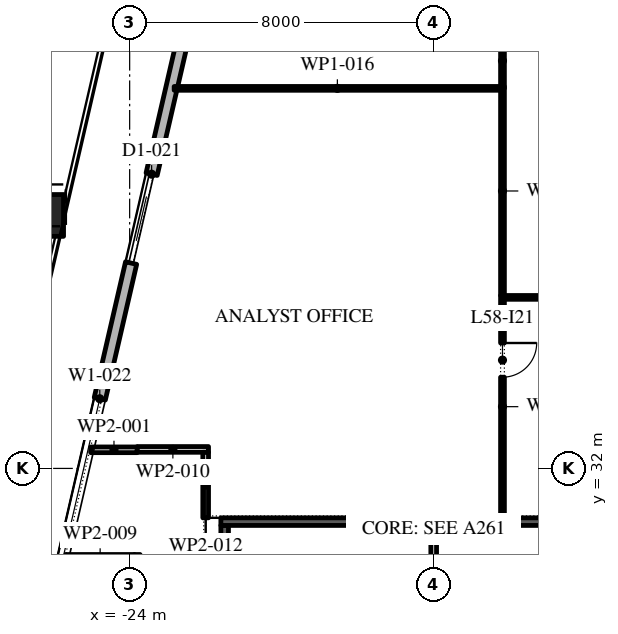
"""IFC4 building model, lengths in metres.
Left out: names, types, materials, properties, quantities, classifications, styles, units other than length and angle.
Written with IfcOpenShell. Run it as: python <this file> out.ifc"""

import sys

from ifc_helpers import new_model, si_unit, direction, frame, frame_2d, origin, origin_2d, place, context, subcontext, project, spatial, rectangle, extrude, element, fill, save


model = new_model("IFC4")
c1 = context("Model", 3, precision=1e-05, world=origin(), true_north=direction((0.0, 1.0)))
c2 = subcontext(c1, "Body", "Model", "MODEL_VIEW")
j1 = project(units=[si_unit("LENGTHUNIT", "METRE"), si_unit("PLANEANGLEUNIT", "RADIAN")], contexts=[c1])
p1 = place(None, origin())
s1 = spatial("IfcSite", under=j1, at=p1, CompositionType="ELEMENT")
p2 = place(p1, origin())
s2 = spatial("IfcBuilding", under=s1, at=p2, CompositionType="ELEMENT")
p3 = place(p2, frame((0.0, 0.0, 268.2)))
s3 = spatial("IfcBuildingStorey", under=s2, at=p3, CompositionType="ELEMENT", Elevation=268.2)
p4 = place(p3, frame((-26.29, 38.656, 0.0), z_axis=(0.014559841898, 0.063111984005, 0.997900239743), x_axis=(-0.97440628778, 0.224794097641, 0.0)))
e1 = element("IfcColumn", 1, at=p4, inside=s3, PredefinedType="COLUMN", context=c2, shape_type="SweptSolid", body=[
    extrude(rectangle(XDim=1.1, YDim=1.1, at=origin_2d()), origin(), (0.0, 0.0, 1.0), 4.209),
])
p5 = place(p3, frame((29.616, 40.758, 0.0), z_axis=(0.0, 0.0, 1.0), x_axis=(-0.974370532314, 0.224949029246, 0.0)))
e2 = element("IfcWall", 2, at=p5, inside=s3, PredefinedType="STANDARD", context=c2, shape_type="SweptSolid", body=[
    extrude(rectangle(XDim=48.0, YDim=0.3, at=frame_2d((24.0, 0.0))), origin(), (0.0, 0.0, 1.0), 4.0),
])
p6 = place(p5, frame((1.625, 0.0, 0.45)))
e3 = element("IfcOpeningElement", 3, at=p6, cuts=e2, PredefinedType="OPENING", context=c2, shape_type="SweptSolid", body=[
    extrude(rectangle(XDim=4.5, YDim=2.575, at=frame_2d((2.25, 1.288))), frame((0.0, 0.16, 0.0), z_axis=(0.0, -1.0, 0.0), x_axis=(1.0, 0.0, 0.0)), (0.0, 0.0, 1.0), 0.32),
])
p7 = place(p5, frame((10.575, 0.0, 0.0)))
e4 = element("IfcOpeningElement", 4, at=p7, cuts=e2, PredefinedType="OPENING", context=c2, shape_type="SweptSolid", body=[
    extrude(rectangle(XDim=2.4, YDim=3.5, at=frame_2d((1.2, 1.75))), frame((0.0, 0.16, 0.0), z_axis=(0.0, -1.0, 0.0), x_axis=(1.0, 0.0, 0.0)), (0.0, 0.0, 1.0), 0.32),
])
p8 = place(p5, frame((17.575, 0.0, 0.45)))
e5 = element("IfcOpeningElement", 5, at=p8, cuts=e2, PredefinedType="OPENING", context=c2, shape_type="SweptSolid", body=[
    extrude(rectangle(XDim=4.5, YDim=2.45, at=frame_2d((2.25, 1.225))), frame((0.0, 0.16, 0.0), z_axis=(0.0, -1.0, 0.0), x_axis=(1.0, 0.0, 0.0)), (0.0, 0.0, 1.0), 0.32),
])
p9 = place(p5, frame((25.625, 0.0, 0.45)))
e6 = element("IfcOpeningElement", 6, at=p9, cuts=e2, PredefinedType="OPENING", context=c2, shape_type="SweptSolid", body=[
    extrude(rectangle(XDim=4.5, YDim=2.45, at=frame_2d((2.25, 1.225))), frame((0.0, 0.16, 0.0), z_axis=(0.0, -1.0, 0.0), x_axis=(1.0, 0.0, 0.0)), (0.0, 0.0, 1.0), 0.32),
])
p10 = place(p5, frame((33.675, 0.0, 0.45)))
e7 = element("IfcOpeningElement", 7, at=p10, cuts=e2, PredefinedType="OPENING", context=c2, shape_type="SweptSolid", body=[
    extrude(rectangle(XDim=4.5, YDim=2.45, at=frame_2d((2.25, 1.225))), frame((0.0, 0.16, 0.0), z_axis=(0.0, -1.0, 0.0), x_axis=(1.0, 0.0, 0.0)), (0.0, 0.0, 1.0), 0.32),
])
p11 = place(p5, frame((42.175, 0.0, 0.0)))
e8 = element("IfcOpeningElement", 8, at=p11, cuts=e2, PredefinedType="OPENING", context=c2, shape_type="SweptSolid", body=[
    extrude(rectangle(XDim=2.4, YDim=3.5, at=frame_2d((1.2, 1.75))), frame((0.0, 0.16, 0.0), z_axis=(0.0, -1.0, 0.0), x_axis=(1.0, 0.0, 0.0)), (0.0, 0.0, 1.0), 0.32),
])
p12 = place(p3, frame((-21.359, 48.678, 0.0), z_axis=(0.0, 0.0, 1.0), x_axis=(-0.224949198343, -0.974370493275, 0.0)))
e9 = element("IfcWall", 9, at=p12, inside=s3, PredefinedType="STANDARD", context=c2, shape_type="SweptSolid", body=[
    extrude(rectangle(XDim=49.5, YDim=0.3, at=frame_2d((24.75, 0.0))), origin(), (0.0, 0.0, 1.0), 4.0),
])
p13 = place(p12, frame((1.157, 0.0, 0.45)))
e10 = element("IfcOpeningElement", 10, at=p13, cuts=e9, PredefinedType="OPENING", context=c2, shape_type="SweptSolid", body=[
    extrude(rectangle(XDim=4.5, YDim=3.05, at=frame_2d((2.25, 1.525))), frame((0.0, 0.16, 0.0), z_axis=(0.0, -1.0, 0.0), x_axis=(1.0, 0.0, 0.0)), (0.0, 0.0, 1.0), 0.32),
])
p14 = place(p12, frame((9.171, 0.0, 0.0)))
e11 = element("IfcOpeningElement", 11, at=p14, cuts=e9, PredefinedType="OPENING", context=c2, shape_type="SweptSolid", body=[
    extrude(rectangle(XDim=2.4, YDim=3.5, at=frame_2d((1.2, 1.75))), frame((0.0, 0.16, 0.0), z_axis=(0.0, -1.0, 0.0), x_axis=(1.0, 0.0, 0.0)), (0.0, 0.0, 1.0), 0.32),
])
p15 = place(p12, frame((15.236, 0.0, 0.45)))
e12 = element("IfcOpeningElement", 12, at=p15, cuts=e9, PredefinedType="OPENING", context=c2, shape_type="SweptSolid", body=[
    extrude(rectangle(XDim=4.5, YDim=3.05, at=frame_2d((2.25, 1.525))), frame((0.0, 0.16, 0.0), z_axis=(0.0, -1.0, 0.0), x_axis=(1.0, 0.0, 0.0)), (0.0, 0.0, 1.0), 0.32),
])
p16 = place(p12, frame((22.35, 0.0, 0.45)))
e13 = element("IfcOpeningElement", 13, at=p16, cuts=e9, PredefinedType="OPENING", context=c2, shape_type="SweptSolid", body=[
    extrude(rectangle(XDim=4.5, YDim=3.05, at=frame_2d((2.25, 1.525))), frame((0.0, 0.16, 0.0), z_axis=(0.0, -1.0, 0.0), x_axis=(1.0, 0.0, 0.0)), (0.0, 0.0, 1.0), 0.32),
])
p17 = place(p12, frame((29.464, 0.0, 0.45)))
e14 = element("IfcOpeningElement", 14, at=p17, cuts=e9, PredefinedType="OPENING", context=c2, shape_type="SweptSolid", body=[
    extrude(rectangle(XDim=4.5, YDim=3.05, at=frame_2d((2.25, 1.525))), frame((0.0, 0.16, 0.0), z_axis=(0.0, -1.0, 0.0), x_axis=(1.0, 0.0, 0.0)), (0.0, 0.0, 1.0), 0.32),
])
p18 = place(p12, frame((37.628, 0.0, 0.0)))
e15 = element("IfcOpeningElement", 15, at=p18, cuts=e9, PredefinedType="OPENING", context=c2, shape_type="SweptSolid", body=[
    extrude(rectangle(XDim=2.4, YDim=3.325, at=frame_2d((1.2, 1.663))), frame((0.0, 0.16, 0.0), z_axis=(0.0, -1.0, 0.0), x_axis=(1.0, 0.0, 0.0)), (0.0, 0.0, 1.0), 0.32),
])
p19 = place(p12, frame((43.693, 0.0, 0.45)))
e16 = element("IfcOpeningElement", 16, at=p19, cuts=e9, PredefinedType="OPENING", context=c2, shape_type="SweptSolid", body=[
    extrude(rectangle(XDim=4.5, YDim=2.825, at=frame_2d((2.25, 1.413))), frame((0.0, 0.16, 0.0), z_axis=(0.0, -1.0, 0.0), x_axis=(1.0, 0.0, 0.0)), (0.0, 0.0, 1.0), 0.32),
])
p20 = place(p3, frame((-21.5, 25.75, 0.0), z_axis=(0.0, 0.0, 1.0), x_axis=(0.0, 1.0, 0.0)))
e17 = element("IfcWall", 17, at=p20, inside=s3, PredefinedType="SHEAR", context=c2, shape_type="SweptSolid", body=[
    extrude(rectangle(XDim=4.75, YDim=0.2, at=frame_2d((2.375, 0.0))), origin(), (0.0, 0.0, 1.0), 4.0),
])
p21 = place(p20, frame((1.925, 0.0, 0.0)))
e18 = element("IfcOpeningElement", 18, at=p21, cuts=e17, PredefinedType="OPENING", context=c2, shape_type="SweptSolid", body=[
    extrude(rectangle(XDim=0.9, YDim=2.1, at=frame_2d((0.45, 1.05))), frame((0.0, 0.11, 0.0), z_axis=(0.0, -1.0, 0.0), x_axis=(1.0, 0.0, 0.0)), (0.0, 0.0, 1.0), 0.22),
])
p22 = place(p3, frame((-21.6, 30.6, 0.0), z_axis=(0.0, 0.0, 1.0), x_axis=(1.0, 0.0, 0.0)))
e19 = element("IfcWall", 19, at=p22, inside=s3, PredefinedType="SHEAR", context=c2, shape_type="SweptSolid", body=[
    extrude(rectangle(XDim=11.2, YDim=0.2, at=frame_2d((5.6, 0.0))), origin(), (0.0, 0.0, 1.0), 4.0),
])
p23 = place(p3, frame((-16.0, 25.75, 0.0), z_axis=(0.0, 0.0, 1.0), x_axis=(0.0, 1.0, 0.0)))
e20 = element("IfcWall", 20, at=p23, inside=s3, PredefinedType="PARTITIONING", context=c2, shape_type="SweptSolid", body=[
    extrude(rectangle(XDim=4.75, YDim=0.15, at=frame_2d((2.375, 0.0))), origin(), (0.0, 0.0, 1.0), 4.0),
])
p24 = place(p3, frame((-25.025, 32.49, 0.0), z_axis=(0.0, 0.0, 1.0), x_axis=(1.0, 0.0, 0.0)))
e21 = element("IfcWall", 21, at=p24, inside=s3, PredefinedType="PARTITIONING", context=c2, shape_type="SweptSolid", body=[
    extrude(rectangle(XDim=1.225, YDim=0.15, at=frame_2d((0.612, 0.0))), origin(), (0.0, 0.0, 1.0), 4.0),
])
p25 = place(p3, frame((-23.8, 32.5, 0.0), z_axis=(0.0, 0.0, 1.0), x_axis=(1.0, 0.0, 0.0)))
e22 = element("IfcWall", 22, at=p25, inside=s3, PredefinedType="PARTITIONING", context=c2, shape_type="SweptSolid", body=[
    extrude(rectangle(XDim=1.875, YDim=0.15, at=frame_2d((0.938, 0.0))), origin(), (0.0, 0.0, 1.0), 4.0),
])
p26 = place(p3, frame((-22.0, 32.425, 0.0), z_axis=(0.0, 0.0, 1.0), x_axis=(0.0, -1.0, 0.0)))
e23 = element("IfcWall", 23, at=p26, inside=s3, PredefinedType="PARTITIONING", context=c2, shape_type="SweptSolid", body=[
    extrude(rectangle(XDim=1.725, YDim=0.15, at=frame_2d((0.863, 0.0))), origin(), (0.0, 0.0, 1.0), 4.0),
])
p27 = place(p3, frame((-14.19, 30.7, 0.0), z_axis=(0.0, 0.0, 1.0), x_axis=(0.0, 1.0, 0.0)))
e24 = element("IfcWall", 24, at=p27, inside=s3, PredefinedType="PARTITIONING", context=c2, shape_type="SweptSolid", body=[
    extrude(rectangle(XDim=5.85, YDim=0.1, at=frame_2d((2.925, 0.0))), origin(), (0.0, 0.0, 1.0), 4.0),
])
p28 = place(p27, frame((3.7, 0.0, 0.0)))
e25 = element("IfcOpeningElement", 25, at=p28, cuts=e24, PredefinedType="OPENING", context=c2, shape_type="SweptSolid", body=[
    extrude(rectangle(XDim=0.9, YDim=2.1, at=frame_2d((0.45, 1.05))), frame((0.0, 0.06, 0.0), z_axis=(0.0, -1.0, 0.0), x_axis=(1.0, 0.0, 0.0)), (0.0, 0.0, 1.0), 0.12),
])
p29 = place(p3, frame((-14.19, 36.55, 0.0), z_axis=(0.0, 0.0, 1.0), x_axis=(0.0, 1.0, 0.0)))
e26 = element("IfcWall", 26, at=p29, inside=s3, PredefinedType="PARTITIONING", context=c2, shape_type="SweptSolid", body=[
    extrude(rectangle(XDim=5.5, YDim=0.1, at=frame_2d((2.75, 0.0))), origin(), (0.0, 0.0, 1.0), 4.0),
])
p30 = place(p3, frame((-14.14, 36.5, 0.0), z_axis=(0.0, 0.0, 1.0), x_axis=(1.0, 0.0, 0.0)))
e27 = element("IfcWall", 27, at=p30, inside=s3, PredefinedType="PARTITIONING", context=c2, shape_type="SweptSolid", body=[
    extrude(rectangle(XDim=8.19, YDim=0.1, at=frame_2d((4.095, 0.0))), origin(), (0.0, 0.0, 1.0), 4.0),
])
p31 = place(p30, frame((2.79, 0.0, 0.0)))
e28 = element("IfcOpeningElement", 28, at=p31, cuts=e27, PredefinedType="OPENING", context=c2, shape_type="SweptSolid", body=[
    extrude(rectangle(XDim=0.9, YDim=2.1, at=frame_2d((0.45, 1.05))), frame((0.0, 0.06, 0.0), z_axis=(0.0, -1.0, 0.0), x_axis=(1.0, 0.0, 0.0)), (0.0, 0.0, 1.0), 0.12),
])
p32 = place(p3, frame((-14.24, 42.0, 0.0), z_axis=(0.0, 0.0, 1.0), x_axis=(-1.0, 0.0, 0.0)))
e29 = element("IfcWall", 29, at=p32, inside=s3, PredefinedType="PARTITIONING", context=c2, shape_type="SweptSolid", body=[
    extrude(rectangle(XDim=8.589, YDim=0.1, at=frame_2d((4.294, 0.0))), origin(), (0.0, 0.0, 1.0), 4.0),
])
p33 = place(p3, frame((-14.19, 42.0, 0.0), z_axis=(0.0, 0.0, 1.0), x_axis=(0.0, 1.0, 0.0)))
e30 = element("IfcWall", 30, at=p33, inside=s3, PredefinedType="PARTITIONING", context=c2, shape_type="SweptSolid", body=[
    extrude(rectangle(XDim=1.45, YDim=0.1, at=frame_2d((0.725, 0.0))), origin(), (0.0, 0.0, 1.0), 4.0),
])
p34 = place(p14, origin())
e31 = element("IfcDoor", 31, at=p34, inside=s3, OperationType="DOUBLE_DOOR_SLIDING", PredefinedType="DOOR", context=c2, shape_type="SweptSolid", body=[
    extrude(rectangle(XDim=2.4, YDim=3.5, at=frame_2d((1.2, 1.75))), frame((0.0, 0.025, 0.0), z_axis=(0.0, -1.0, 0.0), x_axis=(1.0, 0.0, 0.0)), (0.0, 0.0, 1.0), 0.05),
])
fill(e11, e31)
p35 = place(p15, origin())
e32 = element("IfcWindow", 32, at=p35, inside=s3, PartitioningType="DOUBLE_PANEL_VERTICAL", PredefinedType="WINDOW", context=c2, shape_type="SweptSolid", body=[
    extrude(rectangle(XDim=4.5, YDim=3.05, at=frame_2d((2.25, 1.525))), frame((0.0, 0.03, 0.0), z_axis=(0.0, -1.0, 0.0), x_axis=(1.0, 0.0, 0.0)), (0.0, 0.0, 1.0), 0.06),
])
fill(e12, e32)
p36 = place(p28, frame((0.9, 0.0, 0.0), z_axis=(0.0, 0.0, 1.0), x_axis=(-1.0, 0.0, 0.0)))
e33 = element("IfcDoor", 33, at=p36, inside=s3, OperationType="SINGLE_SWING_RIGHT", PredefinedType="DOOR", context=c2, shape_type="SweptSolid", body=[
    extrude(rectangle(XDim=0.9, YDim=2.1, at=frame_2d((0.45, 1.05))), frame((0.0, 0.025, 0.0), z_axis=(0.0, -1.0, 0.0), x_axis=(1.0, 0.0, 0.0)), (0.0, 0.0, 1.0), 0.05),
])
fill(e25, e33)
save(model, sys.argv[1])
